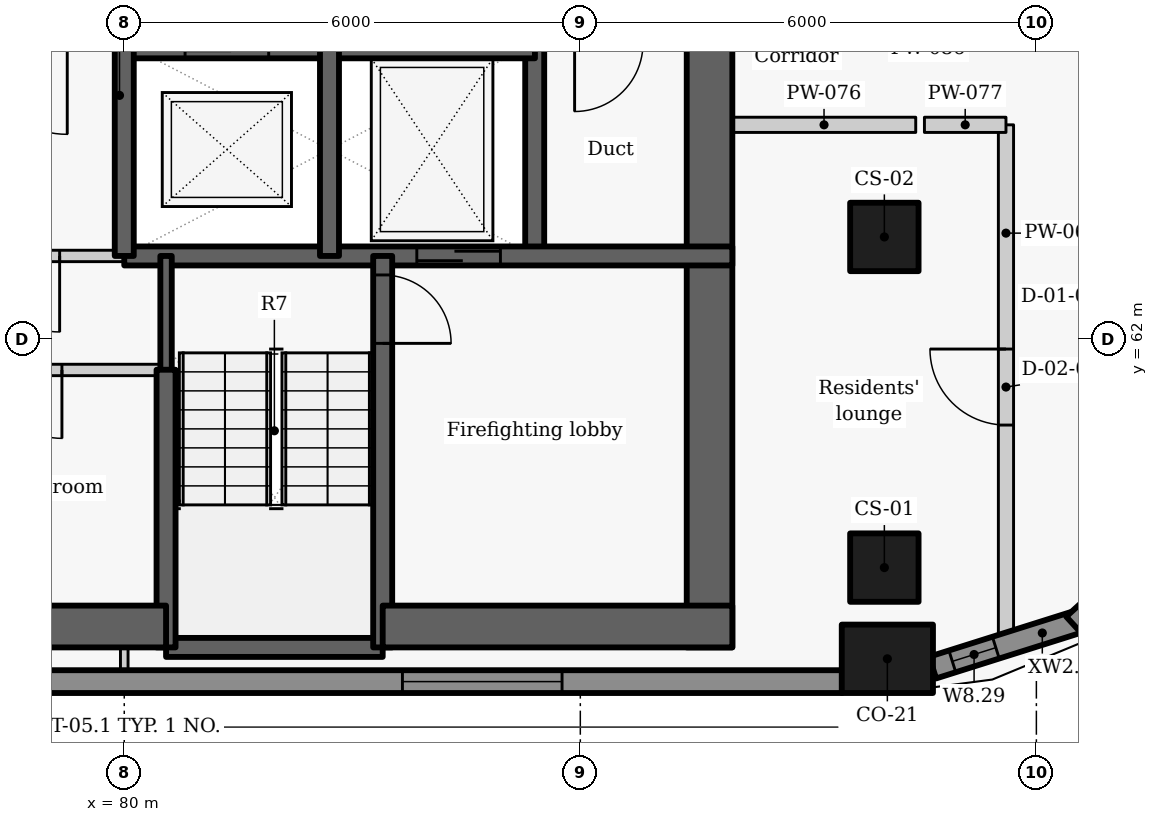
"""IFC4 building model, lengths in metres.
Left out: names, types, materials, properties, quantities, classifications, styles, units other than length and angle.
Written with IfcOpenShell. Run it as: python <this file> out.ifc"""

import sys

from ifc_helpers import new_model, si_unit, direction, frame, frame_2d, origin, origin_2d, place, context, subcontext, project, spatial, rectangle, extrude, element, fill, save


model = new_model("IFC4")
c1 = context("Model", 3, precision=1e-05, world=origin(), true_north=direction((0.0, 1.0)))
c2 = subcontext(c1, "Body", "Model", "MODEL_VIEW")
j1 = project(units=[si_unit("LENGTHUNIT", "METRE"), si_unit("PLANEANGLEUNIT", "RADIAN")], contexts=[c1])
p1 = place(None, origin())
s1 = spatial("IfcSite", under=j1, at=p1, CompositionType="ELEMENT")
p2 = place(p1, origin())
s2 = spatial("IfcBuilding", under=s1, at=p2, CompositionType="ELEMENT")
p3 = place(p2, frame((0.0, 0.0, 183.3)))
s3 = spatial("IfcBuildingStorey", under=s2, at=p3, CompositionType="ELEMENT", Elevation=183.3)
p4 = place(p3, frame((90.04, 57.8, 0.0), z_axis=(0.0, 0.0, 1.0), x_axis=(1.0, 0.0, 0.0)))
e1 = element("IfcColumn", 1, at=p4, inside=s3, PredefinedType="COLUMN", context=c2, shape_type="SweptSolid", body=[
    extrude(rectangle(XDim=1.2, YDim=0.9, at=origin_2d()), origin(), (0.0, 0.0, 1.0), 3.3),
])
for number, where, z_axis, x_axis in (
    (2, (90.0, 59.0, 0.0), (0.0, 0.0, 1.0), (0.0, 1.0, 0.0)),
    (3, (90.0, 63.35, 0.0), (0.0, 0.0, 1.0), (0.0, 1.0, 0.0)),
):
    element("IfcColumn", number, at=place(p3, frame(where, z_axis=z_axis, x_axis=x_axis)), inside=s3, PredefinedType="COLUMN", context=c2, shape_type="SweptSolid", body=[
        extrude(rectangle(XDim=0.9, YDim=0.9, at=origin_2d()), origin(), (0.0, 0.0, 1.0), 3.3),
    ])
p5 = place(p3, frame((70.551, 57.5, 0.0), z_axis=(0.0, 0.0, 1.0), x_axis=(1.0, 0.0, 0.0)))
e4 = element("IfcWall", 4, at=p5, inside=s3, PredefinedType="SOLIDWALL", context=c2, shape_type="SweptSolid", body=[
    extrude(rectangle(XDim=18.893, YDim=0.3, at=frame_2d((9.446, 0.0))), origin(), (0.0, 0.0, 1.0), 2.425),
])
p6 = place(p5, frame((3.687, 0.0, 0.9)))
e5 = element("IfcOpeningElement", 5, at=p6, cuts=e4, PredefinedType="OPENING", context=c2, shape_type="SweptSolid", body=[
    extrude(rectangle(XDim=2.1, YDim=1.1, at=frame_2d((1.05, 0.55))), frame((0.0, 0.16, 0.0), z_axis=(0.0, -1.0, 0.0), x_axis=(1.0, 0.0, 0.0)), (0.0, 0.0, 1.0), 0.32),
])
p7 = place(p5, frame((13.109, 0.0, 0.9)))
e6 = element("IfcOpeningElement", 6, at=p7, cuts=e4, PredefinedType="OPENING", context=c2, shape_type="SweptSolid", body=[
    extrude(rectangle(XDim=2.1, YDim=1.1, at=frame_2d((1.05, 0.55))), frame((0.0, 0.16, 0.0), z_axis=(0.0, -1.0, 0.0), x_axis=(1.0, 0.0, 0.0)), (0.0, 0.0, 1.0), 0.32),
])
p8 = place(p3, frame((90.636, 57.685, 0.0), z_axis=(0.0, 0.0, 1.0), x_axis=(0.95368324118, 0.300812691707, 0.0)))
e7 = element("IfcWall", 7, at=p8, inside=s3, PredefinedType="SOLIDWALL", context=c2, shape_type="SweptSolid", body=[
    extrude(rectangle(XDim=2.053, YDim=0.3, at=frame_2d((1.027, 0.0))), origin(), (0.0, 0.0, 1.0), 2.425),
])
p9 = place(p8, frame((0.271, 0.0, 0.9)))
e8 = element("IfcOpeningElement", 8, at=p9, cuts=e7, PredefinedType="OPENING", context=c2, shape_type="SweptSolid", body=[
    extrude(rectangle(XDim=0.6, YDim=1.1, at=frame_2d((0.3, 0.55))), frame((0.0, 0.16, 0.0), z_axis=(0.0, -1.0, 0.0), x_axis=(1.0, 0.0, 0.0)), (0.0, 0.0, 1.0), 0.32),
])
p10 = place(p3, frame((92.494, 58.244, 0.0), z_axis=(0.0, 0.0, 1.0), x_axis=(0.73764876128, 0.675184645102, 0.0)))
e9 = element("IfcWall", 9, at=p10, inside=s3, PredefinedType="SOLIDWALL", context=c2, shape_type="SweptSolid", body=[
    extrude(rectangle(XDim=2.048, YDim=0.3, at=frame_2d((1.024, 0.0))), origin(), (0.0, 0.0, 1.0), 2.425),
])
p11 = place(p3, frame((85.4, 63.1, -0.275), z_axis=(0.0, 0.0, 1.0), x_axis=(0.0, 1.0, 0.0)))
e10 = element("IfcWall", 10, at=p11, inside=s3, PredefinedType="SHEAR", context=c2, shape_type="SweptSolid", body=[
    extrude(rectangle(XDim=2.8, YDim=0.25, at=frame_2d((1.4, 0.0))), origin(), (0.0, 0.0, 1.0), 3.3),
])
p12 = place(p3, frame((87.7, 72.2, -0.275), z_axis=(0.0, 0.0, 1.0), x_axis=(0.0, -1.0, 0.0)))
e11 = element("IfcWall", 11, at=p12, inside=s3, PredefinedType="SHEAR", context=c2, shape_type="SweptSolid", body=[
    extrude(rectangle(XDim=14.25, YDim=0.6, at=frame_2d((7.125, 0.0))), origin(), (0.0, 0.0, 1.0), 3.3),
])
p13 = place(p12, frame((3.852, 0.0, 0.275)))
e12 = element("IfcOpeningElement", 12, at=p13, cuts=e11, PredefinedType="OPENING", context=c2, shape_type="SweptSolid", body=[
    extrude(rectangle(XDim=1.5, YDim=2.1, at=frame_2d((0.75, 1.05))), frame((0.0, 0.31, 0.0), z_axis=(0.0, -1.0, 0.0), x_axis=(1.0, 0.0, 0.0)), (0.0, 0.0, 1.0), 0.62),
])
p14 = place(p3, frame((79.997, 65.9, -0.275), z_axis=(0.0, 0.0, 1.0), x_axis=(1.0, 0.0, 0.0)))
e13 = element("IfcWall", 13, at=p14, inside=s3, PredefinedType="SHEAR", context=c2, shape_type="SweptSolid", body=[
    extrude(rectangle(XDim=5.406, YDim=0.4, at=frame_2d((2.703, 0.0))), origin(), (0.0, 0.0, 1.0), 3.3),
])
p15 = place(p14, frame((0.803, 0.0, 0.275)))
e14 = element("IfcOpeningElement", 14, at=p15, cuts=e13, PredefinedType="OPENING", context=c2, shape_type="SweptSolid", body=[
    extrude(rectangle(XDim=1.1, YDim=2.1, at=frame_2d((0.55, 1.05))), frame((0.0, 0.21, 0.0), z_axis=(0.0, -1.0, 0.0), x_axis=(1.0, 0.0, 0.0)), (0.0, 0.0, 1.0), 0.42),
])
p16 = place(p3, frame((80.0, 63.1, -0.275), z_axis=(0.0, 0.0, 1.0), x_axis=(1.0, 0.0, 0.0)))
e15 = element("IfcWall", 15, at=p16, inside=s3, PredefinedType="SHEAR", context=c2, shape_type="SweptSolid", body=[
    extrude(rectangle(XDim=8.0, YDim=0.25, at=frame_2d((4.0, 0.0))), origin(), (0.0, 0.0, 1.0), 3.3),
])
p17 = place(p16, frame((3.849, 0.0, 0.275)))
e16 = element("IfcOpeningElement", 16, at=p17, cuts=e15, PredefinedType="OPENING", context=c2, shape_type="SweptSolid", body=[
    extrude(rectangle(XDim=1.1, YDim=2.1, at=frame_2d((0.55, 1.05))), frame((0.0, 0.135, 0.0), z_axis=(0.0, -1.0, 0.0), x_axis=(1.0, 0.0, 0.0)), (0.0, 0.0, 1.0), 0.27),
])
p18 = place(p3, frame((80.0, 63.1, -0.275), z_axis=(0.0, 0.0, 1.0), x_axis=(0.0, 1.0, 0.0)))
e17 = element("IfcWall", 17, at=p18, inside=s3, PredefinedType="SHEAR", context=c2, shape_type="SweptSolid", body=[
    extrude(rectangle(XDim=2.8, YDim=0.25, at=frame_2d((1.4, 0.0))), origin(), (0.0, 0.0, 1.0), 3.3),
])
p19 = place(p3, frame((80.0, 63.1, 0.0), z_axis=(0.0, 0.0, 1.0), x_axis=(-1.0, 0.0, 0.0)))
e18 = element("IfcWall", 18, at=p19, inside=s3, PredefinedType="PARTITIONING", context=c2, shape_type="SweptSolid", body=[
    extrude(rectangle(XDim=2.7, YDim=0.15, at=frame_2d((1.35, 0.0))), origin(), (0.0, 0.0, 1.0), 3.025),
])
p20 = place(p19, frame((0.85, 0.0, 0.0)))
e19 = element("IfcOpeningElement", 19, at=p20, cuts=e18, PredefinedType="OPENING", context=c2, shape_type="SweptSolid", body=[
    extrude(rectangle(XDim=1.0, YDim=2.1, at=frame_2d((0.5, 1.05))), frame((0.0, 0.085, 0.0), z_axis=(0.0, -1.0, 0.0), x_axis=(1.0, 0.0, 0.0)), (0.0, 0.0, 1.0), 0.17),
])
p21 = place(p3, frame((82.7, 63.1, -0.275), z_axis=(0.0, 0.0, 1.0), x_axis=(0.0, 1.0, 0.0)))
e20 = element("IfcWall", 20, at=p21, inside=s3, PredefinedType="SHEAR", context=c2, shape_type="SweptSolid", body=[
    extrude(rectangle(XDim=2.8, YDim=0.25, at=frame_2d((1.4, 0.0))), origin(), (0.0, 0.0, 1.0), 3.3),
])
p22 = place(p3, frame((80.55, 57.95, -0.275), z_axis=(0.0, 0.0, 1.0), x_axis=(1.0, 0.0, 0.0)))
e21 = element("IfcWall", 21, at=p22, inside=s3, PredefinedType="SHEAR", context=c2, shape_type="SweptSolid", body=[
    extrude(rectangle(XDim=2.85, YDim=0.25, at=frame_2d((1.425, 0.0))), origin(), (0.0, 0.0, 1.0), 3.3),
])
p23 = place(p3, frame((83.4, 63.1, -0.275), z_axis=(0.0, 0.0, 1.0), x_axis=(0.0, -1.0, 0.0)))
e22 = element("IfcWall", 22, at=p23, inside=s3, PredefinedType="SHEAR", context=c2, shape_type="SweptSolid", body=[
    extrude(rectangle(XDim=5.15, YDim=0.25, at=frame_2d((2.575, 0.0))), origin(), (0.0, 0.0, 1.0), 3.3),
])
p24 = place(p23, frame((0.25, 0.0, 0.275)))
e23 = element("IfcOpeningElement", 23, at=p24, cuts=e22, PredefinedType="OPENING", context=c2, shape_type="SweptSolid", body=[
    extrude(rectangle(XDim=0.9, YDim=2.1, at=frame_2d((0.45, 1.05))), frame((0.0, 0.135, 0.0), z_axis=(0.0, -1.0, 0.0), x_axis=(1.0, 0.0, 0.0)), (0.0, 0.0, 1.0), 0.27),
])
p25 = place(p3, frame((80.55, 61.597, -0.275), z_axis=(0.0, 0.0, 1.0), x_axis=(0.0, 1.0, 0.0)))
e24 = element("IfcWall", 24, at=p25, inside=s3, PredefinedType="SHEAR", context=c2, shape_type="SweptSolid", body=[
    extrude(rectangle(XDim=1.503, YDim=0.15, at=frame_2d((0.751, 0.0))), origin(), (0.0, 0.0, 1.0), 3.3),
])
p26 = place(p3, frame((80.55, 57.95, -0.275), z_axis=(0.0, 0.0, 1.0), x_axis=(0.0, 1.0, 0.0)))
e25 = element("IfcWall", 25, at=p26, inside=s3, PredefinedType="SHEAR", context=c2, shape_type="SweptSolid", body=[
    extrude(rectangle(XDim=3.653, YDim=0.25, at=frame_2d((1.827, 0.0))), origin(), (0.0, 0.0, 1.0), 3.3),
])
p27 = place(p3, frame((75.35, 58.225, -0.275), z_axis=(0.0, 0.0, 1.0), x_axis=(1.0, 0.0, 0.0)))
e26 = element("IfcWall", 26, at=p27, inside=s3, PredefinedType="SHEAR", context=c2, shape_type="SweptSolid", body=[
    extrude(rectangle(XDim=5.2, YDim=0.55, at=frame_2d((2.6, 0.0))), origin(), (0.0, 0.0, 1.0), 3.3),
])
p28 = place(p3, frame((83.4, 58.225, -0.275), z_axis=(0.0, 0.0, 1.0), x_axis=(1.0, 0.0, 0.0)))
e27 = element("IfcWall", 27, at=p28, inside=s3, PredefinedType="SHEAR", context=c2, shape_type="SweptSolid", body=[
    extrude(rectangle(XDim=4.6, YDim=0.55, at=frame_2d((2.3, 0.0))), origin(), (0.0, 0.0, 1.0), 3.3),
])
p29 = place(p3, frame((80.55, 61.6, 0.0), z_axis=(0.0, 0.0, 1.0), x_axis=(-1.0, 0.0, 0.0)))
e28 = element("IfcWall", 28, at=p29, inside=s3, PredefinedType="PARTITIONING", context=c2, shape_type="SweptSolid", body=[
    extrude(rectangle(XDim=5.2, YDim=0.15, at=frame_2d((2.6, 0.0))), origin(), (0.0, 0.0, 1.0), 3.025),
])
p30 = place(p29, frame((3.97, 0.0, 0.0)))
e29 = element("IfcOpeningElement", 29, at=p30, cuts=e28, PredefinedType="OPENING", context=c2, shape_type="SweptSolid", body=[
    extrude(rectangle(XDim=0.9, YDim=2.1, at=frame_2d((0.45, 1.05))), frame((0.0, 0.085, 0.0), z_axis=(0.0, -1.0, 0.0), x_axis=(1.0, 0.0, 0.0)), (0.0, 0.0, 1.0), 0.17),
])
p31 = place(p29, frame((1.37, 0.0, 0.0)))
e30 = element("IfcOpeningElement", 30, at=p31, cuts=e28, PredefinedType="OPENING", context=c2, shape_type="SweptSolid", body=[
    extrude(rectangle(XDim=0.9, YDim=2.1, at=frame_2d((0.45, 1.05))), frame((0.0, 0.085, 0.0), z_axis=(0.0, -1.0, 0.0), x_axis=(1.0, 0.0, 0.0)), (0.0, 0.0, 1.0), 0.17),
])
p32 = place(p3, frame((91.6, 57.926, 0.0), z_axis=(0.0, 0.0, 1.0), x_axis=(0.0, 1.0, 0.0)))
e31 = element("IfcWall", 31, at=p32, inside=s3, PredefinedType="PARTITIONING", context=c2, shape_type="SweptSolid", body=[
    extrude(rectangle(XDim=6.899, YDim=0.2, at=frame_2d((3.449, 0.0))), origin(), (0.0, 0.0, 1.0), 2.405),
])
p33 = place(p32, frame((2.949, 0.0, 0.0)))
e32 = element("IfcOpeningElement", 32, at=p33, cuts=e31, PredefinedType="OPENING", context=c2, shape_type="SweptSolid", body=[
    extrude(rectangle(XDim=1.0, YDim=2.1, at=frame_2d((0.5, 1.05))), frame((0.0, 0.11, 0.0), z_axis=(0.0, -1.0, 0.0), x_axis=(1.0, 0.0, 0.0)), (0.0, 0.0, 1.0), 0.22),
])
p34 = place(p3, frame((88.0, 64.825, 0.0), z_axis=(0.0, 0.0, 1.0), x_axis=(1.0, 0.0, 0.0)))
e33 = element("IfcWall", 33, at=p34, inside=s3, PredefinedType="PARTITIONING", context=c2, shape_type="SweptSolid", body=[
    extrude(rectangle(XDim=2.413, YDim=0.2, at=frame_2d((1.207, 0.0))), origin(), (0.0, 0.0, 1.0), 2.505),
])
p35 = place(p3, frame((90.527, 64.825, 0.0), z_axis=(0.0, 0.0, 1.0), x_axis=(1.0, 0.0, 0.0)))
e34 = element("IfcWall", 34, at=p35, inside=s3, PredefinedType="PARTITIONING", context=c2, shape_type="SweptSolid", body=[
    extrude(rectangle(XDim=1.073, YDim=0.2, at=frame_2d((0.537, 0.0))), origin(), (0.0, 0.0, 1.0), 3.025),
])
p36 = place(p3, frame((80.0, 57.65, 0.0), z_axis=(0.0, 0.0, 1.0), x_axis=(0.0, 1.0, 0.0)))
e35 = element("IfcWall", 35, at=p36, inside=s3, PredefinedType="PARTITIONING", context=c2, shape_type="SweptSolid", body=[
    extrude(rectangle(XDim=0.3, YDim=0.1, at=frame_2d((0.15, 0.0))), origin(), (0.0, 0.0, 1.0), 3.025),
])
p37 = place(p7, origin())
e36 = element("IfcWindow", 36, at=p37, inside=s3, PartitioningType="SINGLE_PANEL", PredefinedType="WINDOW", context=c2, shape_type="SweptSolid", body=[
    extrude(rectangle(XDim=2.1, YDim=1.1, at=frame_2d((1.05, 0.55))), frame((0.0, 0.03, 0.0), z_axis=(0.0, -1.0, 0.0), x_axis=(1.0, 0.0, 0.0)), (0.0, 0.0, 1.0), 0.06),
])
fill(e6, e36)
p38 = place(p9, origin())
e37 = element("IfcWindow", 37, at=p38, inside=s3, PartitioningType="SINGLE_PANEL", PredefinedType="WINDOW", context=c2, shape_type="SweptSolid", body=[
    extrude(rectangle(XDim=0.6, YDim=1.1, at=frame_2d((0.3, 0.55))), frame((0.0, 0.03, 0.0), z_axis=(0.0, -1.0, 0.0), x_axis=(1.0, 0.0, 0.0)), (0.0, 0.0, 1.0), 0.06),
])
fill(e8, e37)
p39 = place(p17, origin())
e38 = element("IfcDoor", 38, at=p39, inside=s3, OperationType="SLIDING_TO_LEFT", PredefinedType="DOOR", context=c2, shape_type="SweptSolid", body=[
    extrude(rectangle(XDim=1.1, YDim=2.1, at=frame_2d((0.55, 1.05))), frame((0.0, 0.025, 0.0), z_axis=(0.0, -1.0, 0.0), x_axis=(1.0, 0.0, 0.0)), (0.0, 0.0, 1.0), 0.05),
])
fill(e16, e38)
p40 = place(p20, origin())
e39 = element("IfcDoor", 39, at=p40, inside=s3, OperationType="SINGLE_SWING_LEFT", PredefinedType="DOOR", context=c2, shape_type="SweptSolid", body=[
    extrude(rectangle(XDim=1.0, YDim=2.1, at=frame_2d((0.5, 1.05))), frame((0.0, 0.025, 0.0), z_axis=(0.0, -1.0, 0.0), x_axis=(1.0, 0.0, 0.0)), (0.0, 0.0, 1.0), 0.05),
])
fill(e19, e39)
p41 = place(p31, origin())
e40 = element("IfcDoor", 40, at=p41, inside=s3, OperationType="SINGLE_SWING_LEFT", PredefinedType="DOOR", context=c2, shape_type="SweptSolid", body=[
    extrude(rectangle(XDim=0.9, YDim=2.1, at=frame_2d((0.45, 1.05))), frame((0.0, 0.025, 0.0), z_axis=(0.0, -1.0, 0.0), x_axis=(1.0, 0.0, 0.0)), (0.0, 0.0, 1.0), 0.05),
])
fill(e30, e40)
p42 = place(p24, origin())
e41 = element("IfcDoor", 41, at=p42, inside=s3, OperationType="SINGLE_SWING_RIGHT", PredefinedType="DOOR", context=c2, shape_type="SweptSolid", body=[
    extrude(rectangle(XDim=0.9, YDim=2.1, at=frame_2d((0.45, 1.05))), frame((0.0, 0.025, 0.0), z_axis=(0.0, -1.0, 0.0), x_axis=(1.0, 0.0, 0.0)), (0.0, 0.0, 1.0), 0.05),
])
fill(e23, e41)
p43 = place(p33, origin())
e42 = element("IfcDoor", 42, at=p43, inside=s3, OperationType="SINGLE_SWING_RIGHT", PredefinedType="DOOR", context=c2, shape_type="SweptSolid", body=[
    extrude(rectangle(XDim=1.0, YDim=2.1, at=frame_2d((0.5, 1.05))), frame((0.0, 0.025, 0.0), z_axis=(0.0, -1.0, 0.0), x_axis=(1.0, 0.0, 0.0)), (0.0, 0.0, 1.0), 0.05),
])
fill(e32, e42)
save(model, sys.argv[1])
